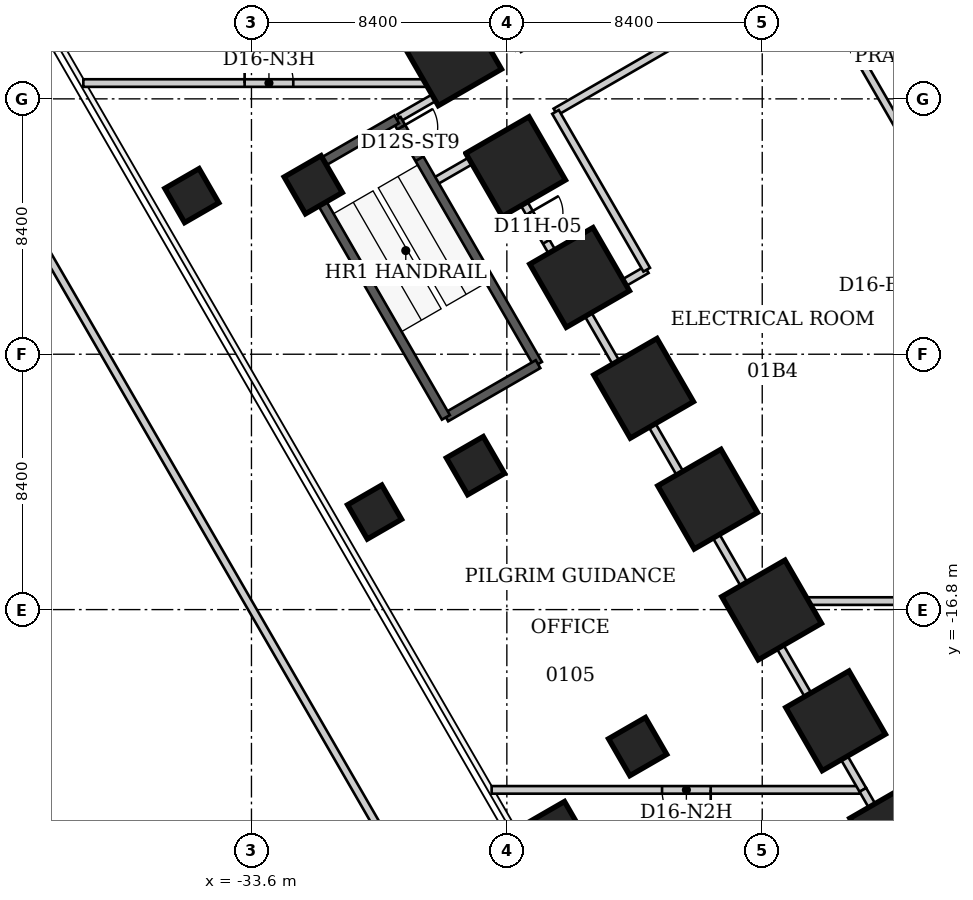
"""IFC4 building model, lengths in metres.
Left out: names, types, materials, properties, quantities, classifications, styles, units other than length and angle.
Written with IfcOpenShell. Run it as: python <this file> out.ifc"""

import sys

from ifc_helpers import new_model, si_unit, direction, frame, frame_2d, origin, origin_2d, place, context, subcontext, project, spatial, rectangle, extrude, element, fill, save


model = new_model("IFC4")
c1 = context("Model", 3, precision=1e-05, world=origin(), true_north=direction((0.0, 1.0)))
c2 = subcontext(c1, "Body", "Model", "MODEL_VIEW")
j1 = project(units=[si_unit("LENGTHUNIT", "METRE"), si_unit("PLANEANGLEUNIT", "RADIAN")], contexts=[c1])
p1 = place(None, origin())
s1 = spatial("IfcSite", under=j1, at=p1, CompositionType="ELEMENT")
p2 = place(p1, origin())
s2 = spatial("IfcBuilding", under=s1, at=p2, CompositionType="ELEMENT")
p3 = place(p2, frame((0.0, 0.0, 6.0)))
s3 = spatial("IfcBuildingStorey", under=s2, at=p3, CompositionType="ELEMENT", Elevation=6.0)
for number, where, z_axis, x_axis in (
    (1, (-12.282, -24.105, 0.0), (0.0, 0.0, 1.0), (-0.866, -0.5, 0.0)),
    (2, (-14.387, -20.459, 0.0), (0.0, 0.0, 1.0), (-0.866, -0.5, 0.0)),
    (3, (-16.491, -16.813, 0.0), (0.0, 0.0, 1.0), (-0.866, -0.5, 0.0)),
    (4, (-18.596, -13.167, 0.0), (0.0, 0.0, 1.0), (-0.866, -0.5, 0.0)),
    (5, (-20.701, -9.521, 0.0), (0.0, 0.0, 1.0), (-0.866, -0.5, 0.0)),
    (6, (-22.806, -5.875, 0.0), (0.0, 0.0, 1.0), (-0.866, -0.5, 0.0)),
    (7, (-24.911, -2.23, 0.0), (0.0, 0.0, 1.0), (-0.866, -0.5, 0.0)),
    (8, (-27.016, 1.416, 0.0), (0.0, 0.0, 1.0), (-0.866, -0.5, 0.0)),
):
    element("IfcColumn", number, at=place(p3, frame(where, z_axis=z_axis, x_axis=x_axis)), inside=s3, PredefinedType="COLUMN", context=c2, shape_type="SweptSolid", body=[
        extrude(rectangle(XDim=2.4, YDim=2.4, at=origin_2d()), origin(), (0.0, 0.0, 1.0), 6.0),
    ])
for number, where, z_axis, x_axis in (
    (9, (-20.898, -21.305, 0.0), (0.0, 0.0, 1.0), (-0.866, -0.5, 0.0)),
    (10, (-26.233, -12.065, 0.0), (0.0, 0.0, 1.0), (-0.866, -0.5, 0.0)),
    (11, (-31.567, -2.825, 0.0), (0.0, 0.0, 1.0), (-0.866, -0.5, 0.0)),
):
    element("IfcColumn", number, at=place(p3, frame(where, z_axis=z_axis, x_axis=x_axis)), inside=s3, PredefinedType="COLUMN", context=c2, shape_type="SweptSolid", body=[
        extrude(rectangle(XDim=1.4, YDim=1.4, at=origin_2d()), origin(), (0.0, 0.0, 1.0), 6.0),
    ])
for number, where, z_axis, x_axis in (
    (12, (-23.542, -24.001, 0.0), (0.0, 0.0, 1.0), (-0.866, -0.5, 0.0)),
    (13, (-29.552, -13.592, 0.0), (0.0, 0.0, 1.0), (-0.866, -0.5, 0.0)),
    (14, (-35.561, -3.183, 0.0), (0.0, 0.0, 1.0), (-0.866, -0.5, 0.0)),
):
    element("IfcColumn", number, at=place(p3, frame(where, z_axis=z_axis, x_axis=x_axis)), inside=s3, PredefinedType="COLUMN", context=c2, shape_type="SweptSolid", body=[
        extrude(rectangle(XDim=1.3, YDim=1.3, at=origin_2d()), origin(), (0.0, 0.0, 1.0), 6.0),
    ])
p4 = place(p3, frame((-47.782, 7.822, 0.0), z_axis=(0.0, 0.0, 1.0), x_axis=(0.499999154746, -0.866025891791, 0.0)))
e15 = element("IfcWall", 15, at=p4, inside=s3, PredefinedType="PARAPET", context=c2, shape_type="SweptSolid", body=[
    extrude(rectangle(XDim=61.33, YDim=0.25, at=frame_2d((30.665, 0.0))), origin(), (0.0, 0.0, 1.0), 1.1),
])
p5 = place(p3, frame((-39.13, 0.52, 0.0), z_axis=(0.0, 0.0, 1.0), x_axis=(1.0, 0.0, 0.0)))
e16 = element("IfcWall", 16, at=p5, inside=s3, PredefinedType="PARTITIONING", context=c2, shape_type="SweptSolid", body=[
    extrude(rectangle(XDim=12.21, YDim=0.25, at=frame_2d((6.105, 0.0))), origin(), (0.0, 0.0, 1.0), 5.75),
])
p6 = place(p5, frame((5.305, 0.0, 0.0)))
e17 = element("IfcOpeningElement", 17, at=p6, cuts=e16, PredefinedType="OPENING", context=c2, shape_type="SweptSolid", body=[
    extrude(rectangle(XDim=1.6, YDim=2.4, at=frame_2d((0.8, 1.2))), frame((0.0, 0.125, 0.0), z_axis=(0.0, -1.0, 0.0), x_axis=(1.0, 0.0, 0.0)), (0.0, 0.0, 1.0), 0.25),
])
p7 = place(p3, frame((-29.54, 5.06, 0.0), z_axis=(0.0, 0.0, 1.0), x_axis=(0.499846097802, -0.866114241029, 0.0)))
e18 = element("IfcWall", 18, at=p7, inside=s3, PredefinedType="PARTITIONING", context=c2, shape_type="SweptSolid", body=[
    extrude(rectangle(XDim=5.242, YDim=0.25, at=frame_2d((2.621, 0.0))), origin(), (0.0, 0.0, 1.0), 4.04),
])
p8 = place(p7, frame((1.971, 0.0, 0.0)))
e19 = element("IfcOpeningElement", 19, at=p8, cuts=e18, PredefinedType="OPENING", context=c2, shape_type="SweptSolid", body=[
    extrude(rectangle(XDim=1.1, YDim=2.2, at=frame_2d((0.55, 1.1))), frame((0.0, 0.125, 0.0), z_axis=(0.0, -1.0, 0.0), x_axis=(1.0, 0.0, 0.0)), (0.0, 0.0, 1.0), 0.25),
])
p9 = place(p3, frame((-27.54, -2.7, 0.0), z_axis=(0.0, 0.0, 1.0), x_axis=(0.866853445344, 0.49856303944, 0.0)))
e20 = element("IfcWall", 20, at=p9, inside=s3, PredefinedType="PARTITIONING", context=c2, shape_type="SweptSolid", body=[
    extrude(rectangle(XDim=2.146, YDim=0.25, at=frame_2d((1.073, 0.0))), origin(), (0.0, 0.0, 1.0), 5.84),
])
p10 = place(p3, frame((-26.92, 0.52, 0.0), z_axis=(0.0, 0.0, 1.0), x_axis=(0.496138938357, -0.868243142124, 0.0)))
e21 = element("IfcWall", 21, at=p10, inside=s3, PredefinedType="PARTITIONING", context=c2, shape_type="SweptSolid", body=[
    extrude(rectangle(XDim=0.081, YDim=0.25, at=frame_2d((0.041, 0.0))), origin(), (0.0, 0.0, 1.0), 5.84),
])
p11 = place(p3, frame((-26.88, 0.45, 0.0), z_axis=(0.0, 0.0, 1.0), x_axis=(-0.866853445344, -0.49856303944, 0.0)))
e22 = element("IfcWall", 22, at=p11, inside=s3, PredefinedType="PARTITIONING", context=c2, shape_type="SweptSolid", body=[
    extrude(rectangle(XDim=2.146, YDim=0.25, at=frame_2d((1.073, 0.0))), origin(), (0.0, 0.0, 1.0), 5.84),
])
p12 = place(p3, frame((-25.68, -1.63, 0.0), z_axis=(0.0, 0.0, 1.0), x_axis=(0.500116102252, -0.865958361741, 0.0)))
e23 = element("IfcWall", 23, at=p12, inside=s3, PredefinedType="PARTITIONING", context=c2, shape_type="SweptSolid", body=[
    extrude(rectangle(XDim=5.995, YDim=0.25, at=frame_2d((2.997, 0.0))), origin(), (0.0, 0.0, 1.0), 4.04),
])
p13 = place(p12, frame((2.448, 0.0, 0.0)))
e24 = element("IfcOpeningElement", 24, at=p13, cuts=e23, PredefinedType="OPENING", context=c2, shape_type="SweptSolid", body=[
    extrude(rectangle(XDim=1.1, YDim=2.2, at=frame_2d((0.55, 1.1))), frame((0.0, 0.125, 0.0), z_axis=(0.0, -1.0, 0.0), x_axis=(1.0, 0.0, 0.0)), (0.0, 0.0, 1.0), 0.25),
])
p14 = place(p3, frame((-23.6, -0.43, 0.0), z_axis=(0.0, 0.0, 1.0), x_axis=(0.865975432538, 0.500086542752, 0.0)))
e25 = element("IfcWall", 25, at=p14, inside=s3, PredefinedType="PARTITIONING", context=c2, shape_type="SweptSolid", body=[
    extrude(rectangle(XDim=9.538, YDim=0.25, at=frame_2d((4.769, 0.0))), origin(), (0.0, 0.0, 1.0), 5.84),
])
p15 = place(p3, frame((-22.682, -6.821, 0.0), z_axis=(0.0, 0.0, 1.0), x_axis=(0.500140682179, -0.865944165654, 0.0)))
e26 = element("IfcWall", 26, at=p15, inside=s3, PredefinedType="PARTITIONING", context=c2, shape_type="SweptSolid", body=[
    extrude(rectangle(XDim=11.2, YDim=0.25, at=frame_2d((5.6, 0.0))), origin(), (0.0, 0.0, 1.0), 4.04),
])
p16 = place(p3, frame((-22.68, -6.82, 0.0), z_axis=(0.0, 0.0, 1.0), x_axis=(0.866177122335, 0.499737123639, 0.0)))
e27 = element("IfcWall", 27, at=p16, inside=s3, PredefinedType="PARTITIONING", context=c2, shape_type="SweptSolid", body=[
    extrude(rectangle(XDim=2.401, YDim=0.25, at=frame_2d((1.201, 0.0))), origin(), (0.0, 0.0, 1.0), 5.84),
])
p17 = place(p3, frame((-20.6, -5.62, 0.0), z_axis=(0.0, 0.0, 1.0), x_axis=(-0.50043093139, 0.865776462436, 0.0)))
e28 = element("IfcWall", 28, at=p17, inside=s3, PredefinedType="PARTITIONING", context=c2, shape_type="SweptSolid", body=[
    extrude(rectangle(XDim=5.995, YDim=0.25, at=frame_2d((2.998, 0.0))), origin(), (0.0, 0.0, 1.0), 5.84),
])
p18 = place(p3, frame((-15.34, 4.34, 0.0), z_axis=(0.0, 0.0, 1.0), x_axis=(0.499811677007, -0.866134104817, 0.0)))
e29 = element("IfcWall", 29, at=p18, inside=s3, PredefinedType="PARTITIONING", context=c2, shape_type="SweptSolid", body=[
    extrude(rectangle(XDim=7.343, YDim=0.25, at=frame_2d((3.671, 0.0))), origin(), (0.0, 0.0, 1.0), 5.84),
])
p19 = place(p3, frame((-13.49, -22.73, 0.0), z_axis=(0.0, 0.0, 1.0), x_axis=(-1.0, 0.0, 0.0)))
e30 = element("IfcWall", 30, at=p19, inside=s3, PredefinedType="PARTITIONING", context=c2, shape_type="SweptSolid", body=[
    extrude(rectangle(XDim=12.21, YDim=0.25, at=frame_2d((6.105, 0.0))), origin(), (0.0, 0.0, 1.0), 5.75),
])
p20 = place(p19, frame((5.005, 0.0, 0.0)))
e31 = element("IfcOpeningElement", 31, at=p20, cuts=e30, PredefinedType="OPENING", context=c2, shape_type="SweptSolid", body=[
    extrude(rectangle(XDim=1.6, YDim=2.4, at=frame_2d((0.8, 1.2))), frame((0.0, 0.125, 0.0), z_axis=(0.0, -1.0, 0.0), x_axis=(1.0, 0.0, 0.0)), (0.0, 0.0, 1.0), 0.25),
])
p21 = place(p3, frame((-13.49, -22.73, 0.0), z_axis=(0.0, 0.0, 1.0), x_axis=(-0.500498166141, 0.865737596325, 0.0)))
e32 = element("IfcWall", 32, at=p21, inside=s3, PredefinedType="PARTITIONING", context=c2, shape_type="SweptSolid", body=[
    extrude(rectangle(XDim=7.173, YDim=0.25, at=frame_2d((3.586, 0.0))), origin(), (0.0, 0.0, 1.0), 4.04),
])
p22 = place(p3, frame((-12.08, -25.18, 0.0), z_axis=(0.0, 0.0, 1.0), x_axis=(-0.49878752461, 0.86672429601, 0.0)))
e33 = element("IfcWall", 33, at=p22, inside=s3, PredefinedType="PARTITIONING", context=c2, shape_type="SweptSolid", body=[
    extrude(rectangle(XDim=2.827, YDim=0.25, at=frame_2d((1.413, 0.0))), origin(), (0.0, 0.0, 1.0), 4.04),
])
p23 = place(p3, frame((-3.33, -16.52, 0.0), z_axis=(0.0, 0.0, 1.0), x_axis=(-1.0, 0.0, 0.0)))
e34 = element("IfcWall", 34, at=p23, inside=s3, PredefinedType="PARTITIONING", context=c2, shape_type="SweptSolid", body=[
    extrude(rectangle(XDim=13.75, YDim=0.25, at=frame_2d((6.875, 0.0))), origin(), (0.0, 0.0, 1.0), 5.84),
])
p24 = place(p3, frame((-28.824, -0.672, 0.0), z_axis=(0.0, 0.0, 1.0), x_axis=(0.499984536904, -0.866034331223, 0.0)))
e35 = element("IfcWall", 35, at=p24, inside=s3, PredefinedType="SHEAR", context=c2, shape_type="SweptSolid", body=[
    extrude(rectangle(XDim=9.3, YDim=0.3, at=frame_2d((4.65, 0.0))), origin(), (0.0, 0.0, 1.0), 6.0),
])
p25 = place(p24, frame((0.3, 0.0, 0.0)))
e36 = element("IfcOpeningElement", 36, at=p25, cuts=e35, PredefinedType="OPENING", context=c2, shape_type="SweptSolid", body=[
    extrude(rectangle(XDim=1.2, YDim=2.4, at=frame_2d((0.6, 1.2))), frame((0.0, 0.15, 0.0), z_axis=(0.0, -1.0, 0.0), x_axis=(1.0, 0.0, 0.0)), (0.0, 0.0, 1.0), 0.3),
])
p26 = place(p3, frame((-24.174, -8.727, 0.0), z_axis=(0.0, 0.0, 1.0), x_axis=(-0.866019471182, -0.500010275428, 0.0)))
e37 = element("IfcWall", 37, at=p26, inside=s3, PredefinedType="SHEAR", context=c2, shape_type="SweptSolid", body=[
    extrude(rectangle(XDim=3.5, YDim=0.3, at=frame_2d((1.75, 0.0))), origin(), (0.0, 0.0, 1.0), 6.0),
])
p27 = place(p3, frame((-27.205, -10.477, 0.0), z_axis=(0.0, 0.0, 1.0), x_axis=(-0.499984536904, 0.866034331223, 0.0)))
e38 = element("IfcWall", 38, at=p27, inside=s3, PredefinedType="SHEAR", context=c2, shape_type="SweptSolid", body=[
    extrude(rectangle(XDim=9.3, YDim=0.3, at=frame_2d((4.65, 0.0))), origin(), (0.0, 0.0, 1.0), 6.0),
])
p28 = place(p3, frame((-31.855, -2.422, 0.0), z_axis=(0.0, 0.0, 1.0), x_axis=(0.866019471182, 0.500010275428, 0.0)))
e39 = element("IfcWall", 39, at=p28, inside=s3, PredefinedType="SHEAR", context=c2, shape_type="SweptSolid", body=[
    extrude(rectangle(XDim=3.5, YDim=0.3, at=frame_2d((1.75, 0.0))), origin(), (0.0, 0.0, 1.0), 6.0),
])
p29 = place(p13, origin())
e40 = element("IfcDoor", 40, at=p29, inside=s3, OperationType="SINGLE_SWING_LEFT", PredefinedType="DOOR", context=c2, shape_type="SweptSolid", body=[
    extrude(rectangle(XDim=1.1, YDim=2.2, at=frame_2d((0.55, 1.1))), frame((0.0, 0.025, 0.0), z_axis=(0.0, -1.0, 0.0), x_axis=(1.0, 0.0, 0.0)), (0.0, 0.0, 1.0), 0.05),
])
fill(e24, e40)
p30 = place(p20, origin())
e41 = element("IfcDoor", 41, at=p30, inside=s3, OperationType="DOUBLE_DOOR_SINGLE_SWING", PredefinedType="DOOR", context=c2, shape_type="SweptSolid", body=[
    extrude(rectangle(XDim=1.6, YDim=2.4, at=frame_2d((0.8, 1.2))), frame((0.0, 0.025, 0.0), z_axis=(0.0, -1.0, 0.0), x_axis=(1.0, 0.0, 0.0)), (0.0, 0.0, 1.0), 0.05),
])
fill(e31, e41)
p31 = place(p6, origin())
e42 = element("IfcDoor", 42, at=p31, inside=s3, OperationType="DOUBLE_DOOR_SINGLE_SWING", PredefinedType="DOOR", context=c2, shape_type="SweptSolid", body=[
    extrude(rectangle(XDim=1.6, YDim=2.4, at=frame_2d((0.8, 1.2))), frame((0.0, 0.025, 0.0), z_axis=(0.0, -1.0, 0.0), x_axis=(1.0, 0.0, 0.0)), (0.0, 0.0, 1.0), 0.05),
])
fill(e17, e42)
p32 = place(p25, origin())
e43 = element("IfcDoor", 43, at=p32, inside=s3, OperationType="SINGLE_SWING_LEFT", PredefinedType="DOOR", context=c2, shape_type="SweptSolid", body=[
    extrude(rectangle(XDim=1.2, YDim=2.4, at=frame_2d((0.6, 1.2))), frame((0.0, 0.025, 0.0), z_axis=(0.0, -1.0, 0.0), x_axis=(1.0, 0.0, 0.0)), (0.0, 0.0, 1.0), 0.05),
])
fill(e36, e43)
save(model, sys.argv[1])
